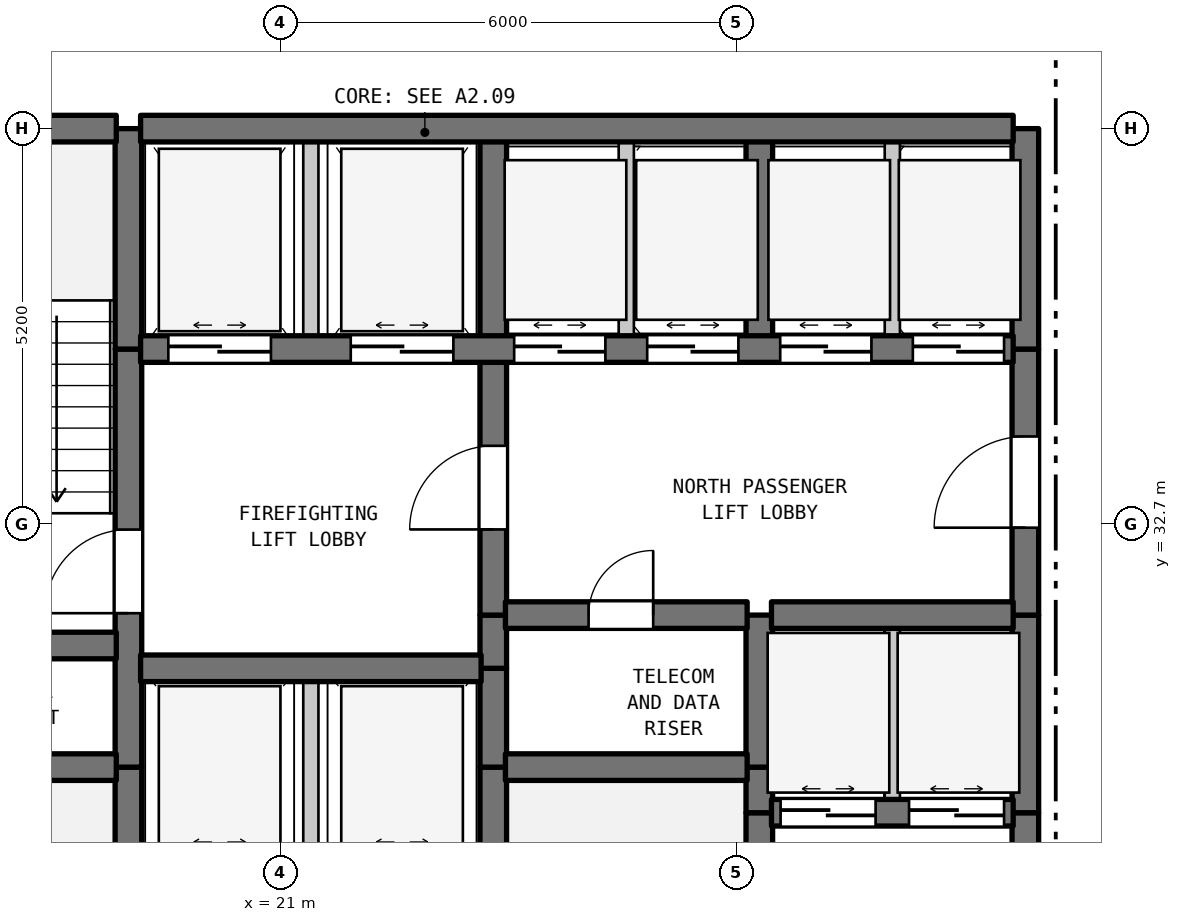
"""IFC4 building model, lengths in metres.
Left out: names, types, materials, properties, quantities, classifications, styles, units other than length and angle.
Written with IfcOpenShell. Run it as: python <this file> out.ifc"""

import sys

from ifc_helpers import new_model, si_unit, direction, frame, frame_2d, origin, place, context, subcontext, project, spatial, rectangle, extrude, element, fill, save


model = new_model("IFC4")
c1 = context("Model", 3, precision=1e-05, world=origin(), true_north=direction((0.0, 1.0)))
c2 = subcontext(c1, "Body", "Model", "MODEL_VIEW")
j1 = project(units=[si_unit("LENGTHUNIT", "METRE"), si_unit("PLANEANGLEUNIT", "RADIAN")], contexts=[c1])
p1 = place(None, origin())
s1 = spatial("IfcSite", under=j1, at=p1, CompositionType="ELEMENT")
p2 = place(p1, origin())
s2 = spatial("IfcBuilding", under=s1, at=p2, CompositionType="ELEMENT")
p3 = place(p2, frame((0.0, 0.0, 116.8)))
s3 = spatial("IfcBuildingStorey", under=s2, at=p3, CompositionType="ELEMENT", Elevation=116.8)
p4 = place(p3, frame((19.0, 28.2, 0.0), z_axis=(0.0, 0.0, 1.0), x_axis=(0.0, 1.0, 0.0)))
e1 = element("IfcWall", 1, at=p4, inside=s3, PredefinedType="SHEAR", context=c2, shape_type="SweptSolid", body=[
    extrude(rectangle(XDim=1.3, YDim=0.35, at=frame_2d((0.65, 0.0))), origin(), (0.0, 0.0, 1.0), 3.38),
])
p5 = place(p3, frame((19.0, 29.5, 0.0), z_axis=(0.0, 0.0, 1.0), x_axis=(0.0, 1.0, 0.0)))
e2 = element("IfcWall", 2, at=p5, inside=s3, PredefinedType="SHEAR", context=c2, shape_type="SweptSolid", body=[
    extrude(rectangle(XDim=5.5, YDim=0.35, at=frame_2d((2.75, 0.0))), origin(), (0.0, 0.0, 1.0), 3.38),
])
p6 = place(p5, frame((2.025, 0.0, 0.0)))
e3 = element("IfcOpeningElement", 3, at=p6, cuts=e2, PredefinedType="OPENING", context=c2, shape_type="SweptSolid", body=[
    extrude(rectangle(XDim=1.1, YDim=2.15, at=frame_2d((0.55, 1.075))), frame((0.0, 0.185, 0.0), z_axis=(0.0, -1.0, 0.0), x_axis=(1.0, 0.0, 0.0)), (0.0, 0.0, 1.0), 0.37),
])
p7 = place(p3, frame((19.0, 35.0, 0.0), z_axis=(0.0, 0.0, 1.0), x_axis=(0.0, 1.0, 0.0)))
e4 = element("IfcWall", 4, at=p7, inside=s3, PredefinedType="SHEAR", context=c2, shape_type="SweptSolid", body=[
    extrude(rectangle(XDim=2.9, YDim=0.35, at=frame_2d((1.45, 0.0))), origin(), (0.0, 0.0, 1.0), 3.38),
])
p8 = place(p3, frame((21.4, 28.2, 0.0), z_axis=(0.0, 0.0, 1.0), x_axis=(0.0, 1.0, 0.0)))
e5 = element("IfcWall", 5, at=p8, inside=s3, PredefinedType="STANDARD", context=c2, shape_type="SweptSolid", body=[
    extrude(rectangle(XDim=2.6, YDim=0.2, at=frame_2d((1.3, 0.0))), origin(), (0.0, 0.0, 1.0), 3.38),
])
p9 = place(p3, frame((21.4, 35.0, 0.0), z_axis=(0.0, 0.0, 1.0), x_axis=(0.0, 1.0, 0.0)))
e6 = element("IfcWall", 6, at=p9, inside=s3, PredefinedType="STANDARD", context=c2, shape_type="SweptSolid", body=[
    extrude(rectangle(XDim=2.9, YDim=0.2, at=frame_2d((1.45, 0.0))), origin(), (0.0, 0.0, 1.0), 3.38),
])
for number, where, z_axis, x_axis in (
    (7, (23.8, 28.2, 0.0), (0.0, 0.0, 1.0), (0.0, 1.0, 0.0)),
    (8, (23.8, 29.5, 0.0), (0.0, 0.0, 1.0), (0.0, 1.0, 0.0)),
):
    element("IfcWall", number, at=place(p3, frame(where, z_axis=z_axis, x_axis=x_axis)), inside=s3, PredefinedType="SHEAR", context=c2, shape_type="SweptSolid", body=[
        extrude(rectangle(XDim=1.3, YDim=0.35, at=frame_2d((0.65, 0.0))), origin(), (0.0, 0.0, 1.0), 3.38),
    ])
p10 = place(p3, frame((23.8, 30.8, 0.0), z_axis=(0.0, 0.0, 1.0), x_axis=(0.0, 1.0, 0.0)))
e9 = element("IfcWall", 9, at=p10, inside=s3, PredefinedType="SHEAR", context=c2, shape_type="SweptSolid", body=[
    extrude(rectangle(XDim=0.7, YDim=0.35, at=frame_2d((0.35, 0.0))), origin(), (0.0, 0.0, 1.0), 3.38),
])
p11 = place(p3, frame((23.8, 31.5, 0.0), z_axis=(0.0, 0.0, 1.0), x_axis=(0.0, 1.0, 0.0)))
e10 = element("IfcWall", 10, at=p11, inside=s3, PredefinedType="SHEAR", context=c2, shape_type="SweptSolid", body=[
    extrude(rectangle(XDim=3.5, YDim=0.35, at=frame_2d((1.75, 0.0))), origin(), (0.0, 0.0, 1.0), 3.38),
])
p12 = place(p11, frame((1.127, 0.0, 0.0)))
e11 = element("IfcOpeningElement", 11, at=p12, cuts=e10, PredefinedType="OPENING", context=c2, shape_type="SweptSolid", body=[
    extrude(rectangle(XDim=1.1, YDim=2.15, at=frame_2d((0.55, 1.075))), frame((0.0, 0.185, 0.0), z_axis=(0.0, -1.0, 0.0), x_axis=(1.0, 0.0, 0.0)), (0.0, 0.0, 1.0), 0.37),
])
p13 = place(p3, frame((23.8, 35.0, 0.0), z_axis=(0.0, 0.0, 1.0), x_axis=(0.0, 1.0, 0.0)))
e12 = element("IfcWall", 12, at=p13, inside=s3, PredefinedType="SHEAR", context=c2, shape_type="SweptSolid", body=[
    extrude(rectangle(XDim=2.9, YDim=0.35, at=frame_2d((1.45, 0.0))), origin(), (0.0, 0.0, 1.0), 3.38),
])
p14 = place(p3, frame((25.55, 35.0, 0.0), z_axis=(0.0, 0.0, 1.0), x_axis=(0.0, 1.0, 0.0)))
e13 = element("IfcWall", 13, at=p14, inside=s3, PredefinedType="STANDARD", context=c2, shape_type="SweptSolid", body=[
    extrude(rectangle(XDim=2.9, YDim=0.2, at=frame_2d((1.45, 0.0))), origin(), (0.0, 0.0, 1.0), 3.38),
])
p15 = place(p3, frame((27.3, 25.6, 0.0), z_axis=(0.0, 0.0, 1.0), x_axis=(0.0, 1.0, 0.0)))
e14 = element("IfcWall", 14, at=p15, inside=s3, PredefinedType="SHEAR", context=c2, shape_type="SweptSolid", body=[
    extrude(rectangle(XDim=3.3, YDim=0.35, at=frame_2d((1.65, 0.0))), origin(), (0.0, 0.0, 1.0), 3.38),
])
p16 = place(p3, frame((27.3, 28.9, 0.0), z_axis=(0.0, 0.0, 1.0), x_axis=(0.0, 1.0, 0.0)))
e15 = element("IfcWall", 15, at=p16, inside=s3, PredefinedType="SHEAR", context=c2, shape_type="SweptSolid", body=[
    extrude(rectangle(XDim=0.6, YDim=0.35, at=frame_2d((0.3, 0.0))), origin(), (0.0, 0.0, 1.0), 3.38),
])
p17 = place(p3, frame((27.3, 29.5, 0.0), z_axis=(0.0, 0.0, 1.0), x_axis=(0.0, 1.0, 0.0)))
e16 = element("IfcWall", 16, at=p17, inside=s3, PredefinedType="SHEAR", context=c2, shape_type="SweptSolid", body=[
    extrude(rectangle(XDim=2.0, YDim=0.35, at=frame_2d((1.0, 0.0))), origin(), (0.0, 0.0, 1.0), 3.38),
])
p18 = place(p3, frame((27.3, 35.0, 0.0), z_axis=(0.0, 0.0, 1.0), x_axis=(0.0, 1.0, 0.0)))
e17 = element("IfcWall", 17, at=p18, inside=s3, PredefinedType="SHEAR", context=c2, shape_type="SweptSolid", body=[
    extrude(rectangle(XDim=2.9, YDim=0.35, at=frame_2d((1.45, 0.0))), origin(), (0.0, 0.0, 1.0), 3.38),
])
p19 = place(p3, frame((29.05, 28.9, 0.0), z_axis=(0.0, 0.0, 1.0), x_axis=(0.0, 1.0, 0.0)))
e18 = element("IfcWall", 18, at=p19, inside=s3, PredefinedType="STANDARD", context=c2, shape_type="SweptSolid", body=[
    extrude(rectangle(XDim=2.6, YDim=0.2, at=frame_2d((1.3, 0.0))), origin(), (0.0, 0.0, 1.0), 3.38),
])
p20 = place(p3, frame((29.05, 35.0, 0.0), z_axis=(0.0, 0.0, 1.0), x_axis=(0.0, 1.0, 0.0)))
e19 = element("IfcWall", 19, at=p20, inside=s3, PredefinedType="STANDARD", context=c2, shape_type="SweptSolid", body=[
    extrude(rectangle(XDim=2.9, YDim=0.2, at=frame_2d((1.45, 0.0))), origin(), (0.0, 0.0, 1.0), 3.38),
])
p21 = place(p3, frame((30.8, 25.6, 0.0), z_axis=(0.0, 0.0, 1.0), x_axis=(0.0, 1.0, 0.0)))
e20 = element("IfcWall", 20, at=p21, inside=s3, PredefinedType="SHEAR", context=c2, shape_type="SweptSolid", body=[
    extrude(rectangle(XDim=3.3, YDim=0.35, at=frame_2d((1.65, 0.0))), origin(), (0.0, 0.0, 1.0), 3.38),
])
p22 = place(p21, frame((0.978, 0.0, 0.0)))
e21 = element("IfcOpeningElement", 21, at=p22, cuts=e20, PredefinedType="OPENING", context=c2, shape_type="SweptSolid", body=[
    extrude(rectangle(XDim=1.2, YDim=2.2, at=frame_2d((0.6, 1.1))), frame((0.0, 0.185, 0.0), z_axis=(0.0, -1.0, 0.0), x_axis=(1.0, 0.0, 0.0)), (0.0, 0.0, 1.0), 0.37),
])
p23 = place(p3, frame((30.8, 28.9, 0.0), z_axis=(0.0, 0.0, 1.0), x_axis=(0.0, 1.0, 0.0)))
e22 = element("IfcWall", 22, at=p23, inside=s3, PredefinedType="SHEAR", context=c2, shape_type="SweptSolid", body=[
    extrude(rectangle(XDim=2.6, YDim=0.35, at=frame_2d((1.3, 0.0))), origin(), (0.0, 0.0, 1.0), 3.38),
])
p24 = place(p3, frame((30.8, 31.5, 0.0), z_axis=(0.0, 0.0, 1.0), x_axis=(0.0, 1.0, 0.0)))
e23 = element("IfcWall", 23, at=p24, inside=s3, PredefinedType="SHEAR", context=c2, shape_type="SweptSolid", body=[
    extrude(rectangle(XDim=3.5, YDim=0.35, at=frame_2d((1.75, 0.0))), origin(), (0.0, 0.0, 1.0), 3.38),
])
p25 = place(p24, frame((1.15, 0.0, 0.0)))
e24 = element("IfcOpeningElement", 24, at=p25, cuts=e23, PredefinedType="OPENING", context=c2, shape_type="SweptSolid", body=[
    extrude(rectangle(XDim=1.2, YDim=2.2, at=frame_2d((0.6, 1.1))), frame((0.0, 0.185, 0.0), z_axis=(0.0, -1.0, 0.0), x_axis=(1.0, 0.0, 0.0)), (0.0, 0.0, 1.0), 0.37),
])
p26 = place(p3, frame((30.8, 35.0, 0.0), z_axis=(0.0, 0.0, 1.0), x_axis=(0.0, 1.0, 0.0)))
e25 = element("IfcWall", 25, at=p26, inside=s3, PredefinedType="SHEAR", context=c2, shape_type="SweptSolid", body=[
    extrude(rectangle(XDim=2.9, YDim=0.35, at=frame_2d((1.45, 0.0))), origin(), (0.0, 0.0, 1.0), 3.38),
])
p27 = place(p3, frame((27.46, 28.9, 0.0), z_axis=(0.0, 0.0, 1.0), x_axis=(1.0, 0.0, 0.0)))
e26 = element("IfcWall", 26, at=p27, inside=s3, PredefinedType="SHEAR", context=c2, shape_type="SweptSolid", body=[
    extrude(rectangle(XDim=3.18, YDim=0.35, at=frame_2d((1.59, 0.0))), origin(), (0.0, 0.0, 1.0), 3.38),
])
p28 = place(p27, frame((0.12, 0.0, 0.0)))
e27 = element("IfcOpeningElement", 27, at=p28, cuts=e26, PredefinedType="OPENING", context=c2, shape_type="SweptSolid", body=[
    extrude(rectangle(XDim=1.25, YDim=2.2, at=frame_2d((0.625, 1.1))), frame((0.0, 0.185, 0.0), z_axis=(0.0, -1.0, 0.0), x_axis=(1.0, 0.0, 0.0)), (0.0, 0.0, 1.0), 0.37),
])
p29 = place(p27, frame((1.81, 0.0, 0.0)))
e28 = element("IfcOpeningElement", 28, at=p29, cuts=e26, PredefinedType="OPENING", context=c2, shape_type="SweptSolid", body=[
    extrude(rectangle(XDim=1.25, YDim=2.2, at=frame_2d((0.625, 1.1))), frame((0.0, 0.185, 0.0), z_axis=(0.0, -1.0, 0.0), x_axis=(1.0, 0.0, 0.0)), (0.0, 0.0, 1.0), 0.37),
])
p30 = place(p3, frame((15.16, 29.5, 0.0), z_axis=(0.0, 0.0, 1.0), x_axis=(1.0, 0.0, 0.0)))
e29 = element("IfcWall", 29, at=p30, inside=s3, PredefinedType="SHEAR", context=c2, shape_type="SweptSolid", body=[
    extrude(rectangle(XDim=3.68, YDim=0.35, at=frame_2d((1.84, 0.0))), origin(), (0.0, 0.0, 1.0), 3.38),
])
p31 = place(p3, frame((23.96, 29.5, 0.0), z_axis=(0.0, 0.0, 1.0), x_axis=(1.0, 0.0, 0.0)))
e30 = element("IfcWall", 30, at=p31, inside=s3, PredefinedType="SHEAR", context=c2, shape_type="SweptSolid", body=[
    extrude(rectangle(XDim=3.18, YDim=0.35, at=frame_2d((1.59, 0.0))), origin(), (0.0, 0.0, 1.0), 3.38),
])
p32 = place(p3, frame((19.16, 30.8, 0.0), z_axis=(0.0, 0.0, 1.0), x_axis=(1.0, 0.0, 0.0)))
e31 = element("IfcWall", 31, at=p32, inside=s3, PredefinedType="SHEAR", context=c2, shape_type="SweptSolid", body=[
    extrude(rectangle(XDim=4.48, YDim=0.35, at=frame_2d((2.24, 0.0))), origin(), (0.0, 0.0, 1.0), 3.38),
])
p33 = place(p3, frame((15.16, 31.1, 0.0), z_axis=(0.0, 0.0, 1.0), x_axis=(1.0, 0.0, 0.0)))
e32 = element("IfcWall", 32, at=p33, inside=s3, PredefinedType="SHEAR", context=c2, shape_type="SweptSolid", body=[
    extrude(rectangle(XDim=3.68, YDim=0.35, at=frame_2d((1.84, 0.0))), origin(), (0.0, 0.0, 1.0), 3.38),
])
p34 = place(p3, frame((23.96, 31.5, 0.0), z_axis=(0.0, 0.0, 1.0), x_axis=(1.0, 0.0, 0.0)))
e33 = element("IfcWall", 33, at=p34, inside=s3, PredefinedType="SHEAR", context=c2, shape_type="SweptSolid", body=[
    extrude(rectangle(XDim=3.18, YDim=0.35, at=frame_2d((1.59, 0.0))), origin(), (0.0, 0.0, 1.0), 3.38),
])
p35 = place(p34, frame((1.094, 0.0, 0.0)))
e34 = element("IfcOpeningElement", 34, at=p35, cuts=e33, PredefinedType="OPENING", context=c2, shape_type="SweptSolid", body=[
    extrude(rectangle(XDim=0.85, YDim=2.1, at=frame_2d((0.425, 1.05))), frame((0.0, 0.185, 0.0), z_axis=(0.0, -1.0, 0.0), x_axis=(1.0, 0.0, 0.0)), (0.0, 0.0, 1.0), 0.37),
])
p36 = place(p3, frame((27.46, 31.5, 0.0), z_axis=(0.0, 0.0, 1.0), x_axis=(1.0, 0.0, 0.0)))
e35 = element("IfcWall", 35, at=p36, inside=s3, PredefinedType="SHEAR", context=c2, shape_type="SweptSolid", body=[
    extrude(rectangle(XDim=3.18, YDim=0.35, at=frame_2d((1.59, 0.0))), origin(), (0.0, 0.0, 1.0), 3.38),
])
p37 = place(p3, frame((19.16, 35.0, 0.0), z_axis=(0.0, 0.0, 1.0), x_axis=(1.0, 0.0, 0.0)))
e36 = element("IfcWall", 36, at=p37, inside=s3, PredefinedType="SHEAR", context=c2, shape_type="SweptSolid", body=[
    extrude(rectangle(XDim=11.48, YDim=0.35, at=frame_2d((5.74, 0.0))), origin(), (0.0, 0.0, 1.0), 3.38),
])
p38 = place(p37, frame((0.365, 0.0, 0.0)))
e37 = element("IfcOpeningElement", 37, at=p38, cuts=e36, PredefinedType="OPENING", context=c2, shape_type="SweptSolid", body=[
    extrude(rectangle(XDim=1.35, YDim=2.2, at=frame_2d((0.675, 1.1))), frame((0.0, 0.185, 0.0), z_axis=(0.0, -1.0, 0.0), x_axis=(1.0, 0.0, 0.0)), (0.0, 0.0, 1.0), 0.37),
])
p39 = place(p37, frame((2.765, 0.0, 0.0)))
e38 = element("IfcOpeningElement", 38, at=p39, cuts=e36, PredefinedType="OPENING", context=c2, shape_type="SweptSolid", body=[
    extrude(rectangle(XDim=1.35, YDim=2.2, at=frame_2d((0.675, 1.1))), frame((0.0, 0.185, 0.0), z_axis=(0.0, -1.0, 0.0), x_axis=(1.0, 0.0, 0.0)), (0.0, 0.0, 1.0), 0.37),
])
p40 = place(p37, frame((4.915, 0.0, 0.0)))
e39 = element("IfcOpeningElement", 39, at=p40, cuts=e36, PredefinedType="OPENING", context=c2, shape_type="SweptSolid", body=[
    extrude(rectangle(XDim=1.2, YDim=2.2, at=frame_2d((0.6, 1.1))), frame((0.0, 0.185, 0.0), z_axis=(0.0, -1.0, 0.0), x_axis=(1.0, 0.0, 0.0)), (0.0, 0.0, 1.0), 0.37),
])
p41 = place(p37, frame((6.665, 0.0, 0.0)))
e40 = element("IfcOpeningElement", 40, at=p41, cuts=e36, PredefinedType="OPENING", context=c2, shape_type="SweptSolid", body=[
    extrude(rectangle(XDim=1.2, YDim=2.2, at=frame_2d((0.6, 1.1))), frame((0.0, 0.185, 0.0), z_axis=(0.0, -1.0, 0.0), x_axis=(1.0, 0.0, 0.0)), (0.0, 0.0, 1.0), 0.37),
])
p42 = place(p37, frame((8.415, 0.0, 0.0)))
e41 = element("IfcOpeningElement", 41, at=p42, cuts=e36, PredefinedType="OPENING", context=c2, shape_type="SweptSolid", body=[
    extrude(rectangle(XDim=1.2, YDim=2.2, at=frame_2d((0.6, 1.1))), frame((0.0, 0.185, 0.0), z_axis=(0.0, -1.0, 0.0), x_axis=(1.0, 0.0, 0.0)), (0.0, 0.0, 1.0), 0.37),
])
p43 = place(p37, frame((10.16, 0.0, 0.0)))
e42 = element("IfcOpeningElement", 42, at=p43, cuts=e36, PredefinedType="OPENING", context=c2, shape_type="SweptSolid", body=[
    extrude(rectangle(XDim=1.2, YDim=2.2, at=frame_2d((0.6, 1.1))), frame((0.0, 0.185, 0.0), z_axis=(0.0, -1.0, 0.0), x_axis=(1.0, 0.0, 0.0)), (0.0, 0.0, 1.0), 0.37),
])
p44 = place(p3, frame((15.16, 37.9, 0.0), z_axis=(0.0, 0.0, 1.0), x_axis=(1.0, 0.0, 0.0)))
e43 = element("IfcWall", 43, at=p44, inside=s3, PredefinedType="SHEAR", context=c2, shape_type="SweptSolid", body=[
    extrude(rectangle(XDim=3.68, YDim=0.35, at=frame_2d((1.84, 0.0))), origin(), (0.0, 0.0, 1.0), 3.38),
])
p45 = place(p3, frame((19.16, 37.9, 0.0), z_axis=(0.0, 0.0, 1.0), x_axis=(1.0, 0.0, 0.0)))
e44 = element("IfcWall", 44, at=p45, inside=s3, PredefinedType="SHEAR", context=c2, shape_type="SweptSolid", body=[
    extrude(rectangle(XDim=11.48, YDim=0.35, at=frame_2d((5.74, 0.0))), origin(), (0.0, 0.0, 1.0), 3.38),
])
p46 = place(p6, origin())
e45 = element("IfcDoor", 45, at=p46, inside=s3, OperationType="SINGLE_SWING_LEFT", PredefinedType="DOOR", context=c2, shape_type="SweptSolid", body=[
    extrude(rectangle(XDim=1.1, YDim=2.15, at=frame_2d((0.55, 1.075))), frame((0.0, 0.025, 0.0), z_axis=(0.0, -1.0, 0.0), x_axis=(1.0, 0.0, 0.0)), (0.0, 0.0, 1.0), 0.05),
])
fill(e3, e45)
p47 = place(p12, origin())
e46 = element("IfcDoor", 46, at=p47, inside=s3, OperationType="SINGLE_SWING_LEFT", PredefinedType="DOOR", context=c2, shape_type="SweptSolid", body=[
    extrude(rectangle(XDim=1.1, YDim=2.15, at=frame_2d((0.55, 1.075))), frame((0.0, 0.025, 0.0), z_axis=(0.0, -1.0, 0.0), x_axis=(1.0, 0.0, 0.0)), (0.0, 0.0, 1.0), 0.05),
])
fill(e11, e46)
p48 = place(p25, origin())
e47 = element("IfcDoor", 47, at=p48, inside=s3, OperationType="SINGLE_SWING_LEFT", PredefinedType="DOOR", context=c2, shape_type="SweptSolid", body=[
    extrude(rectangle(XDim=1.2, YDim=2.2, at=frame_2d((0.6, 1.1))), frame((0.0, 0.025, 0.0), z_axis=(0.0, -1.0, 0.0), x_axis=(1.0, 0.0, 0.0)), (0.0, 0.0, 1.0), 0.05),
])
fill(e24, e47)
p49 = place(p28, origin())
e48 = element("IfcDoor", 48, at=p49, inside=s3, OperationType="DOUBLE_DOOR_SLIDING", PredefinedType="DOOR", context=c2, shape_type="SweptSolid", body=[
    extrude(rectangle(XDim=1.25, YDim=2.2, at=frame_2d((0.625, 1.1))), frame((0.0, 0.025, 0.0), z_axis=(0.0, -1.0, 0.0), x_axis=(1.0, 0.0, 0.0)), (0.0, 0.0, 1.0), 0.05),
])
fill(e27, e48)
p50 = place(p29, origin())
e49 = element("IfcDoor", 49, at=p50, inside=s3, OperationType="DOUBLE_DOOR_SLIDING", PredefinedType="DOOR", context=c2, shape_type="SweptSolid", body=[
    extrude(rectangle(XDim=1.25, YDim=2.2, at=frame_2d((0.625, 1.1))), frame((0.0, 0.025, 0.0), z_axis=(0.0, -1.0, 0.0), x_axis=(1.0, 0.0, 0.0)), (0.0, 0.0, 1.0), 0.05),
])
fill(e28, e49)
p51 = place(p35, origin())
e50 = element("IfcDoor", 50, at=p51, inside=s3, OperationType="SINGLE_SWING_RIGHT", PredefinedType="DOOR", context=c2, shape_type="SweptSolid", body=[
    extrude(rectangle(XDim=0.85, YDim=2.1, at=frame_2d((0.425, 1.05))), frame((0.0, 0.025, 0.0), z_axis=(0.0, -1.0, 0.0), x_axis=(1.0, 0.0, 0.0)), (0.0, 0.0, 1.0), 0.05),
])
fill(e34, e50)
p52 = place(p38, origin())
e51 = element("IfcDoor", 51, at=p52, inside=s3, OperationType="DOUBLE_DOOR_SLIDING", PredefinedType="DOOR", context=c2, shape_type="SweptSolid", body=[
    extrude(rectangle(XDim=1.35, YDim=2.2, at=frame_2d((0.675, 1.1))), frame((0.0, 0.025, 0.0), z_axis=(0.0, -1.0, 0.0), x_axis=(1.0, 0.0, 0.0)), (0.0, 0.0, 1.0), 0.05),
])
fill(e37, e51)
p53 = place(p39, origin())
e52 = element("IfcDoor", 52, at=p53, inside=s3, OperationType="DOUBLE_DOOR_SLIDING", PredefinedType="DOOR", context=c2, shape_type="SweptSolid", body=[
    extrude(rectangle(XDim=1.35, YDim=2.2, at=frame_2d((0.675, 1.1))), frame((0.0, 0.025, 0.0), z_axis=(0.0, -1.0, 0.0), x_axis=(1.0, 0.0, 0.0)), (0.0, 0.0, 1.0), 0.05),
])
fill(e38, e52)
p54 = place(p40, origin())
e53 = element("IfcDoor", 53, at=p54, inside=s3, OperationType="DOUBLE_DOOR_SLIDING", PredefinedType="DOOR", context=c2, shape_type="SweptSolid", body=[
    extrude(rectangle(XDim=1.2, YDim=2.2, at=frame_2d((0.6, 1.1))), frame((0.0, 0.025, 0.0), z_axis=(0.0, -1.0, 0.0), x_axis=(1.0, 0.0, 0.0)), (0.0, 0.0, 1.0), 0.05),
])
fill(e39, e53)
p55 = place(p41, origin())
e54 = element("IfcDoor", 54, at=p55, inside=s3, OperationType="DOUBLE_DOOR_SLIDING", PredefinedType="DOOR", context=c2, shape_type="SweptSolid", body=[
    extrude(rectangle(XDim=1.2, YDim=2.2, at=frame_2d((0.6, 1.1))), frame((0.0, 0.025, 0.0), z_axis=(0.0, -1.0, 0.0), x_axis=(1.0, 0.0, 0.0)), (0.0, 0.0, 1.0), 0.05),
])
fill(e40, e54)
p56 = place(p42, origin())
e55 = element("IfcDoor", 55, at=p56, inside=s3, OperationType="DOUBLE_DOOR_SLIDING", PredefinedType="DOOR", context=c2, shape_type="SweptSolid", body=[
    extrude(rectangle(XDim=1.2, YDim=2.2, at=frame_2d((0.6, 1.1))), frame((0.0, 0.025, 0.0), z_axis=(0.0, -1.0, 0.0), x_axis=(1.0, 0.0, 0.0)), (0.0, 0.0, 1.0), 0.05),
])
fill(e41, e55)
p57 = place(p43, origin())
e56 = element("IfcDoor", 56, at=p57, inside=s3, OperationType="DOUBLE_DOOR_SLIDING", PredefinedType="DOOR", context=c2, shape_type="SweptSolid", body=[
    extrude(rectangle(XDim=1.2, YDim=2.2, at=frame_2d((0.6, 1.1))), frame((0.0, 0.025, 0.0), z_axis=(0.0, -1.0, 0.0), x_axis=(1.0, 0.0, 0.0)), (0.0, 0.0, 1.0), 0.05),
])
fill(e42, e56)
save(model, sys.argv[1])
